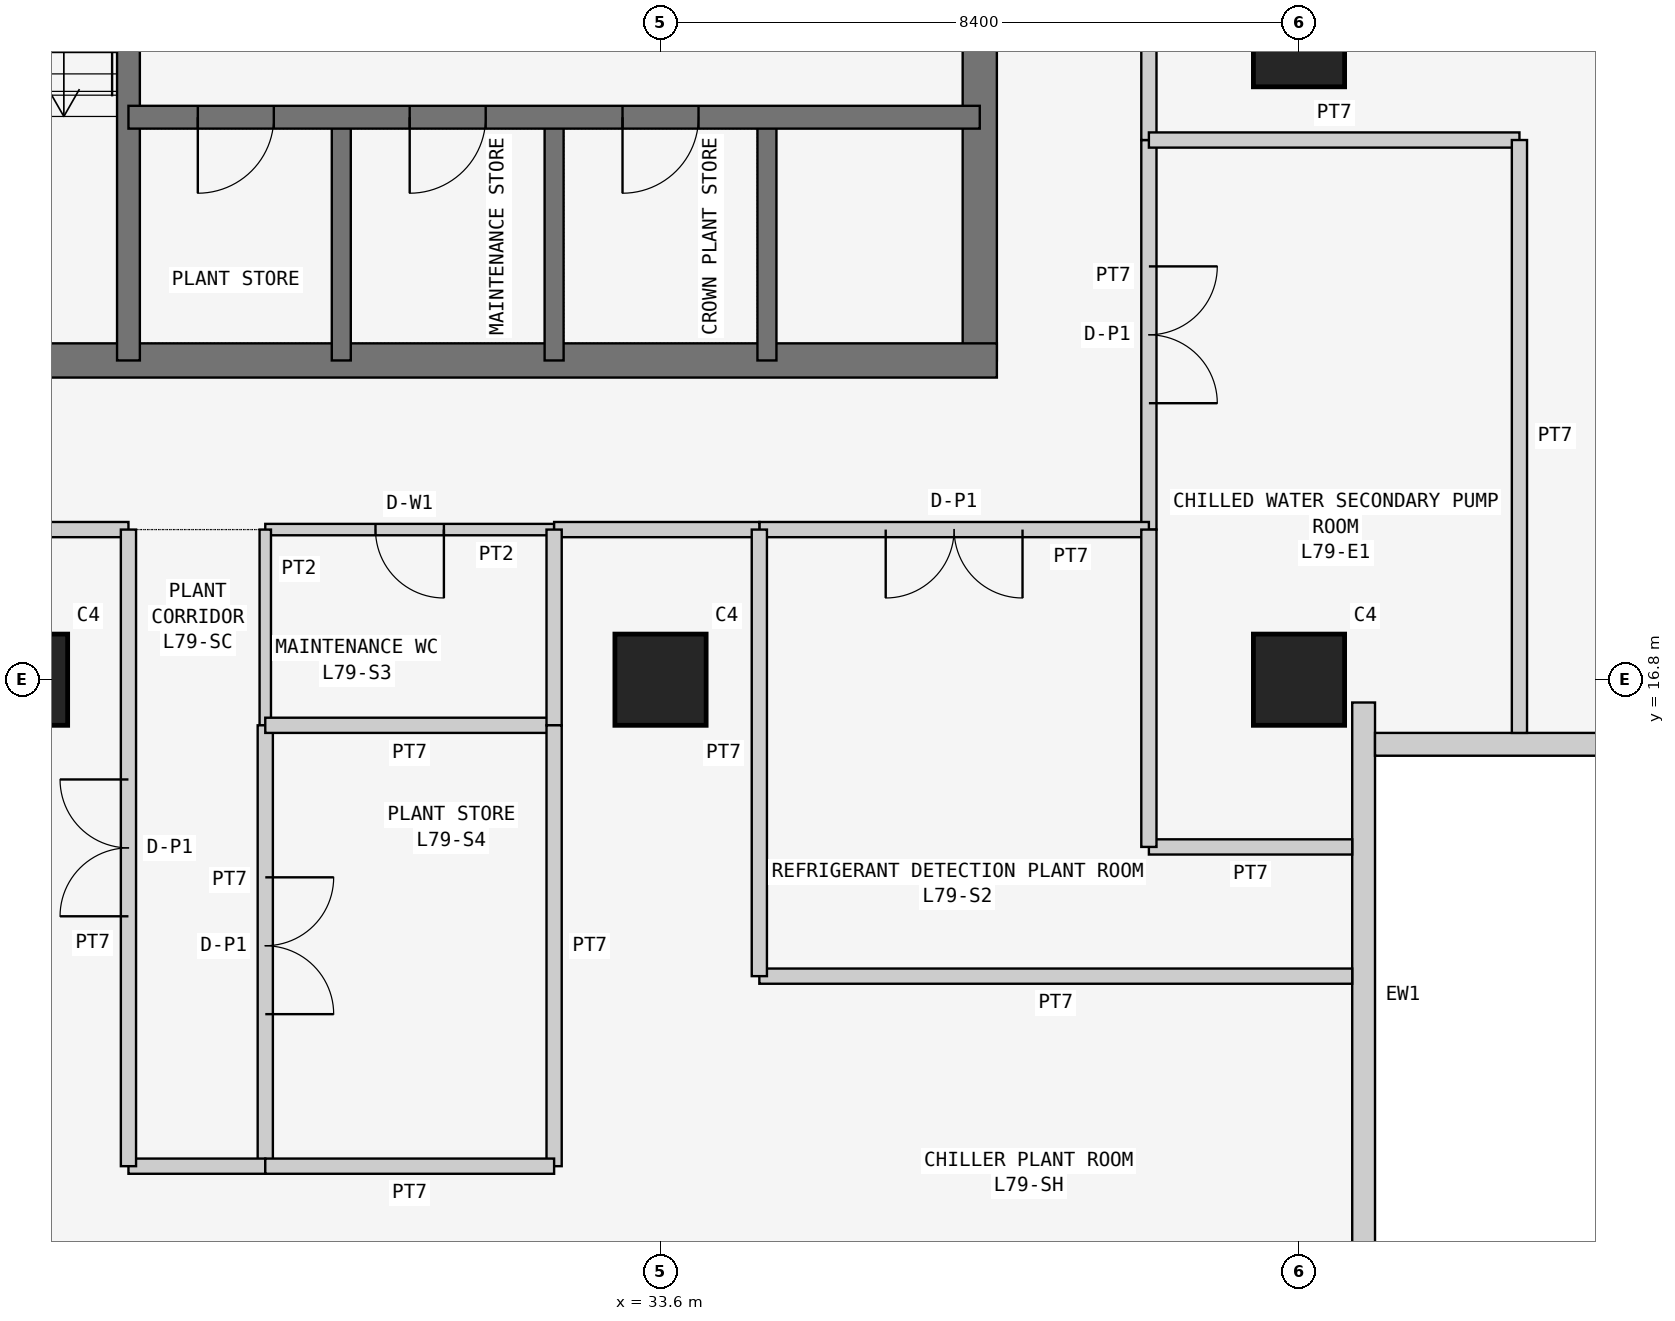
"""IFC4 building model, lengths in metres.
Left out: names, types, materials, properties, quantities, classifications, styles, units other than length and angle.
Written with IfcOpenShell. Run it as: python <this file> out.ifc"""

import sys

from ifc_helpers import new_model, si_unit, direction, frame, frame_2d, origin, origin_2d, place, context, subcontext, project, spatial, rectangle, extrude, element, fill, save


model = new_model("IFC4")
c1 = context("Model", 3, precision=1e-05, world=origin(), true_north=direction((0.0, 1.0)))
c2 = subcontext(c1, "Body", "Model", "MODEL_VIEW")
j1 = project(units=[si_unit("LENGTHUNIT", "METRE"), si_unit("PLANEANGLEUNIT", "RADIAN")], contexts=[c1])
p1 = place(None, origin())
s1 = spatial("IfcSite", under=j1, at=p1, CompositionType="ELEMENT")
p2 = place(p1, origin())
s2 = spatial("IfcBuilding", under=s1, at=p2, CompositionType="ELEMENT")
p3 = place(p2, frame((0.0, 0.0, 300.9)))
s3 = spatial("IfcBuildingStorey", under=s2, at=p3, CompositionType="ELEMENT", Elevation=300.9)
for number, where, z_axis, x_axis in (
    (1, (25.2, 16.8, 0.0), (0.0, 0.0, 1.0), (1.0, 0.0, 0.0)),
    (2, (33.6, 16.8, 0.0), (0.0, 0.0, 1.0), (1.0, 0.0, 0.0)),
    (3, (42.0, 16.8, 0.0), (0.0, 0.0, 1.0), (1.0, 0.0, 0.0)),
    (4, (42.0, 25.2, 0.0), (0.0, 0.0, 1.0), (1.0, 0.0, 0.0)),
):
    element("IfcColumn", number, at=place(p3, frame(where, z_axis=z_axis, x_axis=x_axis)), inside=s3, PredefinedType="COLUMN", context=c2, shape_type="SweptSolid", body=[
        extrude(rectangle(XDim=1.2, YDim=1.2, at=origin_2d()), origin(), (0.0, 0.0, 1.0), 4.5),
    ])
p4 = place(p3, frame((21.0, 21.0, 0.0), z_axis=(0.0, 0.0, 1.0), x_axis=(1.0, 0.0, 0.0)))
e5 = element("IfcWall", 5, at=p4, inside=s3, PredefinedType="SHEAR", context=c2, shape_type="SweptSolid", body=[
    extrude(rectangle(XDim=17.025, YDim=0.45, at=frame_2d((8.512, 0.0))), origin(), (0.0, 0.0, 1.0), 4.5),
])
p5 = place(p3, frame((37.8, 21.0, 0.0), z_axis=(0.0, 0.0, 1.0), x_axis=(0.0, 1.0, 0.0)))
e6 = element("IfcWall", 6, at=p5, inside=s3, PredefinedType="SHEAR", context=c2, shape_type="SweptSolid", body=[
    extrude(rectangle(XDim=17.025, YDim=0.45, at=frame_2d((8.512, 0.0))), origin(), (0.0, 0.0, 1.0), 4.5),
])
p6 = place(p5, frame((5.2, 0.0, 0.0)))
e7 = element("IfcOpeningElement", 7, at=p6, cuts=e6, PredefinedType="OPENING", context=c2, shape_type="SweptSolid", body=[
    extrude(rectangle(XDim=1.2, YDim=2.1, at=frame_2d((0.6, 1.05))), frame((0.0, 0.235, 0.0), z_axis=(0.0, -1.0, 0.0), x_axis=(1.0, 0.0, 0.0)), (0.0, 0.0, 1.0), 0.47),
])
p7 = place(p3, frame((26.6, 21.0, 0.0), z_axis=(0.0, 0.0, 1.0), x_axis=(0.0, 1.0, 0.0)))
e8 = element("IfcWall", 8, at=p7, inside=s3, PredefinedType="SHEAR", context=c2, shape_type="SweptSolid", body=[
    extrude(rectangle(XDim=16.8, YDim=0.3, at=frame_2d((8.4, 0.0))), origin(), (0.0, 0.0, 1.0), 4.5),
])
p8 = place(p7, frame((10.4, 0.0, 0.0)))
e9 = element("IfcOpeningElement", 9, at=p8, cuts=e8, PredefinedType="OPENING", context=c2, shape_type="SweptSolid", body=[
    extrude(rectangle(XDim=1.2, YDim=2.1, at=frame_2d((0.6, 1.05))), frame((0.0, 0.16, 0.0), z_axis=(0.0, -1.0, 0.0), x_axis=(1.0, 0.0, 0.0)), (0.0, 0.0, 1.0), 0.32),
])
p9 = place(p3, frame((26.6, 24.2, 0.0), z_axis=(0.0, 0.0, 1.0), x_axis=(1.0, 0.0, 0.0)))
e10 = element("IfcWall", 10, at=p9, inside=s3, PredefinedType="SHEAR", context=c2, shape_type="SweptSolid", body=[
    extrude(rectangle(XDim=11.2, YDim=0.3, at=frame_2d((5.6, 0.0))), origin(), (0.0, 0.0, 1.0), 4.5),
])
p10 = place(p9, frame((0.913, 0.0, 0.0)))
e11 = element("IfcOpeningElement", 11, at=p10, cuts=e10, PredefinedType="OPENING", context=c2, shape_type="SweptSolid", body=[
    extrude(rectangle(XDim=1.0, YDim=2.1, at=frame_2d((0.5, 1.05))), frame((0.0, 0.16, 0.0), z_axis=(0.0, -1.0, 0.0), x_axis=(1.0, 0.0, 0.0)), (0.0, 0.0, 1.0), 0.32),
])
p11 = place(p9, frame((3.7, 0.0, 0.0)))
e12 = element("IfcOpeningElement", 12, at=p11, cuts=e10, PredefinedType="OPENING", context=c2, shape_type="SweptSolid", body=[
    extrude(rectangle(XDim=1.0, YDim=2.1, at=frame_2d((0.5, 1.05))), frame((0.0, 0.16, 0.0), z_axis=(0.0, -1.0, 0.0), x_axis=(1.0, 0.0, 0.0)), (0.0, 0.0, 1.0), 0.32),
])
p12 = place(p9, frame((6.5, 0.0, 0.0)))
e13 = element("IfcOpeningElement", 13, at=p12, cuts=e10, PredefinedType="OPENING", context=c2, shape_type="SweptSolid", body=[
    extrude(rectangle(XDim=1.0, YDim=2.1, at=frame_2d((0.5, 1.05))), frame((0.0, 0.16, 0.0), z_axis=(0.0, -1.0, 0.0), x_axis=(1.0, 0.0, 0.0)), (0.0, 0.0, 1.0), 0.32),
])
for number, where, z_axis, x_axis in (
    (14, (29.4, 21.0, 0.0), (0.0, 0.0, 1.0), (0.0, 1.0, 0.0)),
    (15, (32.2, 21.0, 0.0), (0.0, 0.0, 1.0), (0.0, 1.0, 0.0)),
    (16, (35.0, 21.0, 0.0), (0.0, 0.0, 1.0), (0.0, 1.0, 0.0)),
):
    element("IfcWall", number, at=place(p3, frame(where, z_axis=z_axis, x_axis=x_axis)), inside=s3, PredefinedType="SHEAR", context=c2, shape_type="SweptSolid", body=[
        extrude(rectangle(XDim=3.2, YDim=0.25, at=frame_2d((1.6, 0.0))), origin(), (0.0, 0.0, 1.0), 4.5),
    ])
p13 = place(p3, frame((42.85, 8.8, 0.0), z_axis=(0.0, 0.0, 1.0), x_axis=(0.0, 1.0, 0.0)))
e17 = element("IfcWall", 17, at=p13, inside=s3, PredefinedType="SOLIDWALL", context=c2, shape_type="SweptSolid", body=[
    extrude(rectangle(XDim=7.7, YDim=0.3, at=frame_2d((3.85, 0.0))), origin(), (0.0, 0.0, 1.0), 4.25),
])
p14 = place(p3, frame((43.0, 15.95, 0.0), z_axis=(0.0, 0.0, 1.0), x_axis=(1.0, 0.0, 0.0)))
e18 = element("IfcWall", 18, at=p14, inside=s3, PredefinedType="SOLIDWALL", context=c2, shape_type="SweptSolid", body=[
    extrude(rectangle(XDim=7.0, YDim=0.3, at=frame_2d((3.5, 0.0))), origin(), (0.0, 0.0, 1.0), 4.25),
])
p15 = place(p3, frame((40.025, 23.9, 0.0), z_axis=(0.0, 0.0, 1.0), x_axis=(0.0, -1.0, 0.0)))
e19 = element("IfcWall", 19, at=p15, inside=s3, PredefinedType="PARTITIONING", context=c2, shape_type="SweptSolid", body=[
    extrude(rectangle(XDim=5.125, YDim=0.2, at=frame_2d((2.562, 0.0))), origin(), (0.0, 0.0, 1.0), 4.25),
])
p16 = place(p15, frame((1.663, 0.0, 0.0)))
e20 = element("IfcOpeningElement", 20, at=p16, cuts=e19, PredefinedType="OPENING", context=c2, shape_type="SweptSolid", body=[
    extrude(rectangle(XDim=1.8, YDim=2.4, at=frame_2d((0.9, 1.2))), frame((0.0, 0.11, 0.0), z_axis=(0.0, -1.0, 0.0), x_axis=(1.0, 0.0, 0.0)), (0.0, 0.0, 1.0), 0.22),
])
p17 = place(p3, frame((40.025, 26.6, 0.0), z_axis=(0.0, 0.0, 1.0), x_axis=(0.0, -1.0, 0.0)))
e21 = element("IfcWall", 21, at=p17, inside=s3, PredefinedType="PARTITIONING", context=c2, shape_type="SweptSolid", body=[
    extrude(rectangle(XDim=2.7, YDim=0.2, at=frame_2d((1.35, 0.0))), origin(), (0.0, 0.0, 1.0), 4.25),
])
p18 = place(p3, frame((40.025, 18.775, 0.0), z_axis=(0.0, 0.0, 1.0), x_axis=(-1.0, 0.0, 0.0)))
e22 = element("IfcWall", 22, at=p18, inside=s3, PredefinedType="PARTITIONING", context=c2, shape_type="SweptSolid", body=[
    extrude(rectangle(XDim=5.125, YDim=0.2, at=frame_2d((2.562, 0.0))), origin(), (0.0, 0.0, 1.0), 4.25),
])
p19 = place(p18, frame((1.663, 0.0, 0.0)))
e23 = element("IfcOpeningElement", 23, at=p19, cuts=e22, PredefinedType="OPENING", context=c2, shape_type="SweptSolid", body=[
    extrude(rectangle(XDim=1.8, YDim=2.4, at=frame_2d((0.9, 1.2))), frame((0.0, 0.11, 0.0), z_axis=(0.0, -1.0, 0.0), x_axis=(1.0, 0.0, 0.0)), (0.0, 0.0, 1.0), 0.22),
])
p20 = place(p3, frame((32.2, 18.775, 0.0), z_axis=(0.0, 0.0, 1.0), x_axis=(-1.0, 0.0, 0.0)))
e24 = element("IfcWall", 24, at=p20, inside=s3, PredefinedType="PARTITIONING", context=c2, shape_type="SweptSolid", body=[
    extrude(rectangle(XDim=3.8, YDim=0.15, at=frame_2d((1.9, 0.0))), origin(), (0.0, 0.0, 1.0), 4.25),
])
p21 = place(p20, frame((1.45, 0.0, 0.0)))
e25 = element("IfcOpeningElement", 25, at=p21, cuts=e24, PredefinedType="OPENING", context=c2, shape_type="SweptSolid", body=[
    extrude(rectangle(XDim=0.9, YDim=2.1, at=frame_2d((0.45, 1.05))), frame((0.0, 0.085, 0.0), z_axis=(0.0, -1.0, 0.0), x_axis=(1.0, 0.0, 0.0)), (0.0, 0.0, 1.0), 0.17),
])
p22 = place(p3, frame((26.6, 18.775, 0.0), z_axis=(0.0, 0.0, 1.0), x_axis=(-1.0, 0.0, 0.0)))
e26 = element("IfcWall", 26, at=p22, inside=s3, PredefinedType="PARTITIONING", context=c2, shape_type="SweptSolid", body=[
    extrude(rectangle(XDim=2.7, YDim=0.2, at=frame_2d((1.35, 0.0))), origin(), (0.0, 0.0, 1.0), 4.25),
])
p23 = place(p3, frame((34.9, 18.775, 0.0), z_axis=(0.0, 0.0, 1.0), x_axis=(-1.0, 0.0, 0.0)))
e27 = element("IfcWall", 27, at=p23, inside=s3, PredefinedType="PARTITIONING", context=c2, shape_type="SweptSolid", body=[
    extrude(rectangle(XDim=2.7, YDim=0.2, at=frame_2d((1.35, 0.0))), origin(), (0.0, 0.0, 1.0), 4.25),
])
p24 = place(p3, frame((40.025, 23.9, 0.0), z_axis=(0.0, 0.0, 1.0), x_axis=(1.0, 0.0, 0.0)))
e28 = element("IfcWall", 28, at=p24, inside=s3, PredefinedType="PARTITIONING", context=c2, shape_type="SweptSolid", body=[
    extrude(rectangle(XDim=4.875, YDim=0.2, at=frame_2d((2.438, 0.0))), origin(), (0.0, 0.0, 1.0), 4.25),
])
p25 = place(p3, frame((44.9, 23.9, 0.0), z_axis=(0.0, 0.0, 1.0), x_axis=(0.0, -1.0, 0.0)))
e29 = element("IfcWall", 29, at=p25, inside=s3, PredefinedType="PARTITIONING", context=c2, shape_type="SweptSolid", body=[
    extrude(rectangle(XDim=7.8, YDim=0.2, at=frame_2d((3.9, 0.0))), origin(), (0.0, 0.0, 1.0), 4.25),
])
p26 = place(p3, frame((42.7, 14.6, 0.0), z_axis=(0.0, 0.0, 1.0), x_axis=(-1.0, 0.0, 0.0)))
e30 = element("IfcWall", 30, at=p26, inside=s3, PredefinedType="PARTITIONING", context=c2, shape_type="SweptSolid", body=[
    extrude(rectangle(XDim=2.675, YDim=0.2, at=frame_2d((1.337, 0.0))), origin(), (0.0, 0.0, 1.0), 4.25),
])
p27 = place(p3, frame((40.025, 14.6, 0.0), z_axis=(0.0, 0.0, 1.0), x_axis=(0.0, 1.0, 0.0)))
e31 = element("IfcWall", 31, at=p27, inside=s3, PredefinedType="PARTITIONING", context=c2, shape_type="SweptSolid", body=[
    extrude(rectangle(XDim=4.175, YDim=0.2, at=frame_2d((2.087, 0.0))), origin(), (0.0, 0.0, 1.0), 4.25),
])
p28 = place(p3, frame((42.7, 12.9, 0.0), z_axis=(0.0, 0.0, 1.0), x_axis=(-1.0, 0.0, 0.0)))
e32 = element("IfcWall", 32, at=p28, inside=s3, PredefinedType="PARTITIONING", context=c2, shape_type="SweptSolid", body=[
    extrude(rectangle(XDim=7.8, YDim=0.2, at=frame_2d((3.9, 0.0))), origin(), (0.0, 0.0, 1.0), 4.25),
])
p29 = place(p3, frame((34.9, 12.9, 0.0), z_axis=(0.0, 0.0, 1.0), x_axis=(0.0, 1.0, 0.0)))
e33 = element("IfcWall", 33, at=p29, inside=s3, PredefinedType="PARTITIONING", context=c2, shape_type="SweptSolid", body=[
    extrude(rectangle(XDim=5.875, YDim=0.2, at=frame_2d((2.938, 0.0))), origin(), (0.0, 0.0, 1.0), 4.25),
])
p30 = place(p3, frame((28.4, 18.775, 0.0), z_axis=(0.0, 0.0, 1.0), x_axis=(0.0, -1.0, 0.0)))
e34 = element("IfcWall", 34, at=p30, inside=s3, PredefinedType="PARTITIONING", context=c2, shape_type="SweptSolid", body=[
    extrude(rectangle(XDim=2.575, YDim=0.15, at=frame_2d((1.288, 0.0))), origin(), (0.0, 0.0, 1.0), 4.25),
])
p31 = place(p3, frame((28.4, 16.2, 0.0), z_axis=(0.0, 0.0, 1.0), x_axis=(0.0, -1.0, 0.0)))
e35 = element("IfcWall", 35, at=p31, inside=s3, PredefinedType="PARTITIONING", context=c2, shape_type="SweptSolid", body=[
    extrude(rectangle(XDim=5.8, YDim=0.2, at=frame_2d((2.9, 0.0))), origin(), (0.0, 0.0, 1.0), 4.25),
])
p32 = place(p31, frame((2.0, 0.0, 0.0)))
e36 = element("IfcOpeningElement", 36, at=p32, cuts=e35, PredefinedType="OPENING", context=c2, shape_type="SweptSolid", body=[
    extrude(rectangle(XDim=1.8, YDim=2.4, at=frame_2d((0.9, 1.2))), frame((0.0, 0.11, 0.0), z_axis=(0.0, -1.0, 0.0), x_axis=(1.0, 0.0, 0.0)), (0.0, 0.0, 1.0), 0.22),
])
p33 = place(p3, frame((28.4, 10.4, 0.0), z_axis=(0.0, 0.0, 1.0), x_axis=(-1.0, 0.0, 0.0)))
e37 = element("IfcWall", 37, at=p33, inside=s3, PredefinedType="PARTITIONING", context=c2, shape_type="SweptSolid", body=[
    extrude(rectangle(XDim=1.8, YDim=0.2, at=frame_2d((0.9, 0.0))), origin(), (0.0, 0.0, 1.0), 4.25),
])
p34 = place(p3, frame((26.6, 10.4, 0.0), z_axis=(0.0, 0.0, 1.0), x_axis=(0.0, 1.0, 0.0)))
e38 = element("IfcWall", 38, at=p34, inside=s3, PredefinedType="PARTITIONING", context=c2, shape_type="SweptSolid", body=[
    extrude(rectangle(XDim=8.375, YDim=0.2, at=frame_2d((4.188, 0.0))), origin(), (0.0, 0.0, 1.0), 4.25),
])
p35 = place(p34, frame((3.288, 0.0, 0.0)))
e39 = element("IfcOpeningElement", 39, at=p35, cuts=e38, PredefinedType="OPENING", context=c2, shape_type="SweptSolid", body=[
    extrude(rectangle(XDim=1.8, YDim=2.4, at=frame_2d((0.9, 1.2))), frame((0.0, 0.11, 0.0), z_axis=(0.0, -1.0, 0.0), x_axis=(1.0, 0.0, 0.0)), (0.0, 0.0, 1.0), 0.22),
])
p36 = place(p3, frame((32.2, 16.2, 0.0), z_axis=(0.0, 0.0, 1.0), x_axis=(-1.0, 0.0, 0.0)))
e40 = element("IfcWall", 40, at=p36, inside=s3, PredefinedType="PARTITIONING", context=c2, shape_type="SweptSolid", body=[
    extrude(rectangle(XDim=3.8, YDim=0.2, at=frame_2d((1.9, 0.0))), origin(), (0.0, 0.0, 1.0), 4.25),
])
p37 = place(p3, frame((32.2, 18.775, 0.0), z_axis=(0.0, 0.0, 1.0), x_axis=(0.0, -1.0, 0.0)))
e41 = element("IfcWall", 41, at=p37, inside=s3, PredefinedType="PARTITIONING", context=c2, shape_type="SweptSolid", body=[
    extrude(rectangle(XDim=2.575, YDim=0.2, at=frame_2d((1.288, 0.0))), origin(), (0.0, 0.0, 1.0), 4.25),
])
p38 = place(p3, frame((32.2, 16.2, 0.0), z_axis=(0.0, 0.0, 1.0), x_axis=(0.0, -1.0, 0.0)))
e42 = element("IfcWall", 42, at=p38, inside=s3, PredefinedType="PARTITIONING", context=c2, shape_type="SweptSolid", body=[
    extrude(rectangle(XDim=5.8, YDim=0.2, at=frame_2d((2.9, 0.0))), origin(), (0.0, 0.0, 1.0), 4.25),
])
p39 = place(p3, frame((32.2, 10.4, 0.0), z_axis=(0.0, 0.0, 1.0), x_axis=(-1.0, 0.0, 0.0)))
e43 = element("IfcWall", 43, at=p39, inside=s3, PredefinedType="PARTITIONING", context=c2, shape_type="SweptSolid", body=[
    extrude(rectangle(XDim=3.8, YDim=0.2, at=frame_2d((1.9, 0.0))), origin(), (0.0, 0.0, 1.0), 4.25),
])
p40 = place(p16, origin())
e44 = element("IfcDoor", 44, at=p40, inside=s3, OperationType="DOUBLE_DOOR_SINGLE_SWING", PredefinedType="DOOR", context=c2, shape_type="SweptSolid", body=[
    extrude(rectangle(XDim=1.8, YDim=2.4, at=frame_2d((0.9, 1.2))), frame((0.0, 0.025, 0.0), z_axis=(0.0, -1.0, 0.0), x_axis=(1.0, 0.0, 0.0)), (0.0, 0.0, 1.0), 0.05),
])
fill(e20, e44)
p41 = place(p19, origin())
e45 = element("IfcDoor", 45, at=p41, inside=s3, OperationType="DOUBLE_DOOR_SINGLE_SWING", PredefinedType="DOOR", context=c2, shape_type="SweptSolid", body=[
    extrude(rectangle(XDim=1.8, YDim=2.4, at=frame_2d((0.9, 1.2))), frame((0.0, 0.025, 0.0), z_axis=(0.0, -1.0, 0.0), x_axis=(1.0, 0.0, 0.0)), (0.0, 0.0, 1.0), 0.05),
])
fill(e23, e45)
p42 = place(p21, origin())
e46 = element("IfcDoor", 46, at=p42, inside=s3, OperationType="SINGLE_SWING_LEFT", PredefinedType="DOOR", context=c2, shape_type="SweptSolid", body=[
    extrude(rectangle(XDim=0.9, YDim=2.1, at=frame_2d((0.45, 1.05))), frame((0.0, 0.025, 0.0), z_axis=(0.0, -1.0, 0.0), x_axis=(1.0, 0.0, 0.0)), (0.0, 0.0, 1.0), 0.05),
])
fill(e25, e46)
p43 = place(p32, origin())
e47 = element("IfcDoor", 47, at=p43, inside=s3, OperationType="DOUBLE_DOOR_SINGLE_SWING", PredefinedType="DOOR", context=c2, shape_type="SweptSolid", body=[
    extrude(rectangle(XDim=1.8, YDim=2.4, at=frame_2d((0.9, 1.2))), frame((0.0, 0.025, 0.0), z_axis=(0.0, -1.0, 0.0), x_axis=(1.0, 0.0, 0.0)), (0.0, 0.0, 1.0), 0.05),
])
fill(e36, e47)
p44 = place(p35, origin())
e48 = element("IfcDoor", 48, at=p44, inside=s3, OperationType="DOUBLE_DOOR_SINGLE_SWING", PredefinedType="DOOR", context=c2, shape_type="SweptSolid", body=[
    extrude(rectangle(XDim=1.8, YDim=2.4, at=frame_2d((0.9, 1.2))), frame((0.0, 0.025, 0.0), z_axis=(0.0, -1.0, 0.0), x_axis=(1.0, 0.0, 0.0)), (0.0, 0.0, 1.0), 0.05),
])
fill(e39, e48)
p45 = place(p10, frame((1.0, 0.0, 0.0), z_axis=(0.0, 0.0, 1.0), x_axis=(-1.0, 0.0, 0.0)))
e49 = element("IfcDoor", 49, at=p45, inside=s3, OperationType="SINGLE_SWING_RIGHT", PredefinedType="DOOR", context=c2, shape_type="SweptSolid", body=[
    extrude(rectangle(XDim=1.0, YDim=2.1, at=frame_2d((0.5, 1.05))), frame((0.0, 0.025, 0.0), z_axis=(0.0, -1.0, 0.0), x_axis=(1.0, 0.0, 0.0)), (0.0, 0.0, 1.0), 0.05),
])
fill(e11, e49)
p46 = place(p11, frame((1.0, 0.0, 0.0), z_axis=(0.0, 0.0, 1.0), x_axis=(-1.0, 0.0, 0.0)))
e50 = element("IfcDoor", 50, at=p46, inside=s3, OperationType="SINGLE_SWING_RIGHT", PredefinedType="DOOR", context=c2, shape_type="SweptSolid", body=[
    extrude(rectangle(XDim=1.0, YDim=2.1, at=frame_2d((0.5, 1.05))), frame((0.0, 0.025, 0.0), z_axis=(0.0, -1.0, 0.0), x_axis=(1.0, 0.0, 0.0)), (0.0, 0.0, 1.0), 0.05),
])
fill(e12, e50)
p47 = place(p12, frame((1.0, 0.0, 0.0), z_axis=(0.0, 0.0, 1.0), x_axis=(-1.0, 0.0, 0.0)))
e51 = element("IfcDoor", 51, at=p47, inside=s3, OperationType="SINGLE_SWING_RIGHT", PredefinedType="DOOR", context=c2, shape_type="SweptSolid", body=[
    extrude(rectangle(XDim=1.0, YDim=2.1, at=frame_2d((0.5, 1.05))), frame((0.0, 0.025, 0.0), z_axis=(0.0, -1.0, 0.0), x_axis=(1.0, 0.0, 0.0)), (0.0, 0.0, 1.0), 0.05),
])
fill(e13, e51)
save(model, sys.argv[1])
